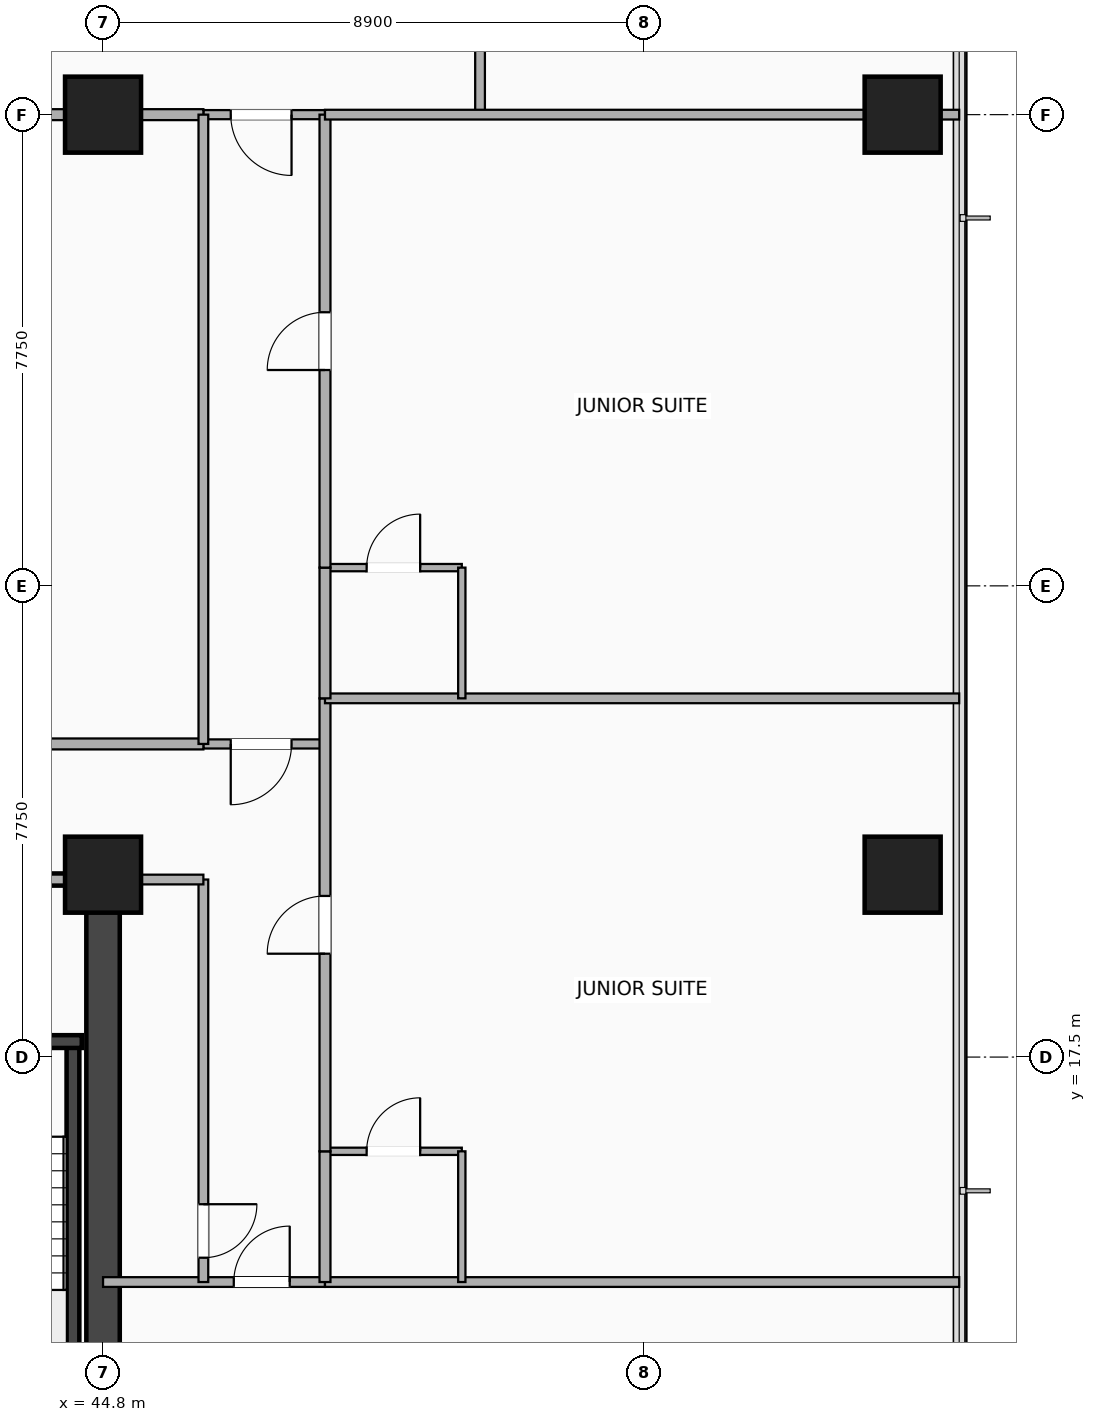
"""IFC4 building model, lengths in metres.
Left out: names, types, materials, properties, quantities, classifications, styles, units other than length and angle.
Written with IfcOpenShell. Run it as: python <this file> out.ifc"""

import sys

from ifc_helpers import new_model, si_unit, direction, frame, frame_2d, origin, origin_2d, place, context, subcontext, project, spatial, rectangle, extrude, element, fill, save


model = new_model("IFC4")
c1 = context("Model", 3, precision=1e-05, world=origin(), true_north=direction((0.0, 1.0)))
c2 = subcontext(c1, "Body", "Model", "MODEL_VIEW")
j1 = project(units=[si_unit("LENGTHUNIT", "METRE"), si_unit("PLANEANGLEUNIT", "RADIAN")], contexts=[c1])
p1 = place(None, origin())
s1 = spatial("IfcSite", under=j1, at=p1, CompositionType="ELEMENT")
p2 = place(p1, origin())
s2 = spatial("IfcBuilding", under=s1, at=p2, CompositionType="ELEMENT")
p3 = place(p2, frame((0.0, 0.0, 98.7)))
s3 = spatial("IfcBuildingStorey", under=s2, at=p3, CompositionType="ELEMENT", Elevation=98.7)
p4 = place(p3, frame((44.8, 3.5, 0.0), z_axis=(0.0, 0.0, 1.0), x_axis=(0.0, 1.0, 0.0)))
e1 = element("IfcWall", 1, at=p4, inside=s3, PredefinedType="SHEAR", context=c2, shape_type="SweptSolid", body=[
    extrude(rectangle(XDim=16.9, YDim=0.55, at=frame_2d((8.45, 0.0))), origin(), (0.0, 0.0, 1.0), 3.24),
])
p5 = place(p3, frame((44.305, 9.745, 0.0), z_axis=(0.0, 0.0, 1.0), x_axis=(0.0, 1.0, 0.0)))
e2 = element("IfcWall", 2, at=p5, inside=s3, PredefinedType="SHEAR", context=c2, shape_type="SweptSolid", body=[
    extrude(rectangle(XDim=8.01, YDim=0.21, at=frame_2d((4.005, 0.0))), origin(), (0.0, 0.0, 1.0), 3.24),
])
p6 = place(p3, frame((37.25, 17.755, 0.0), z_axis=(0.0, 0.0, 1.0), x_axis=(1.0, 0.0, 0.0)))
e3 = element("IfcWall", 3, at=p6, inside=s3, PredefinedType="SHEAR", context=c2, shape_type="SweptSolid", body=[
    extrude(rectangle(XDim=7.2, YDim=0.21, at=frame_2d((3.6, 0.0))), origin(), (0.0, 0.0, 1.0), 3.24),
])
p7 = place(p6, frame((0.25, 0.0, 0.0)))
e4 = element("IfcOpeningElement", 4, at=p7, cuts=e3, PredefinedType="OPENING", context=c2, shape_type="SweptSolid", body=[
    extrude(rectangle(XDim=1.12, YDim=2.2, at=frame_2d((0.56, 1.1))), frame((0.0, 0.115, 0.0), z_axis=(0.0, -1.0, 0.0), x_axis=(1.0, 0.0, 0.0)), (0.0, 0.0, 1.0), 0.23),
])
p8 = place(p6, frame((2.05, 0.0, 0.0)))
e5 = element("IfcOpeningElement", 5, at=p8, cuts=e3, PredefinedType="OPENING", context=c2, shape_type="SweptSolid", body=[
    extrude(rectangle(XDim=1.1, YDim=2.18, at=frame_2d((0.55, 1.09))), frame((0.0, 0.115, 0.0), z_axis=(0.0, -1.0, 0.0), x_axis=(1.0, 0.0, 0.0)), (0.0, 0.0, 1.0), 0.23),
])
p9 = place(p6, frame((5.78, 0.0, 0.0), z_axis=(0.0, 0.0, 1.0), x_axis=(-1.0, 0.0, 0.0)))
e6 = element("IfcOpeningElement", 6, at=p9, cuts=e3, PredefinedType="OPENING", context=c2, shape_type="SweptSolid", body=[
    extrude(rectangle(XDim=1.05, YDim=2.15, at=frame_2d((0.525, 1.075))), frame((0.0, 0.115, 0.0), z_axis=(0.0, -1.0, 0.0), x_axis=(1.0, 0.0, 0.0)), (0.0, 0.0, 1.0), 0.23),
])
for number, where, z_axis, x_axis in (
    (7, (44.8, 20.5, -0.26), (0.0, 0.0, 1.0), (1.0, 0.0, 0.0)),
    (8, (44.8, 33.0, -0.26), (0.0, 0.0, 1.0), (1.0, 0.0, 0.0)),
    (9, (57.95, 20.5, -0.26), (0.0, 0.0, 1.0), (1.0, 0.0, 0.0)),
    (10, (57.95, 33.0, -0.26), (0.0, 0.0, 1.0), (1.0, 0.0, 0.0)),
):
    element("IfcColumn", number, at=place(p3, frame(where, z_axis=z_axis, x_axis=x_axis)), inside=s3, PredefinedType="COLUMN", context=c2, shape_type="SweptSolid", body=[
        extrude(rectangle(XDim=1.25, YDim=1.25, at=origin_2d()), origin(), (0.0, 0.0, 1.0), 3.5),
    ])
p10 = place(p3, frame((37.0, 20.42, 0.0), z_axis=(0.0, 0.0, 1.0), x_axis=(1.0, 0.0, 0.0)))
e11 = element("IfcWall", 11, at=p10, inside=s3, PredefinedType="PARTITIONING", context=c2, shape_type="SweptSolid", body=[
    extrude(rectangle(XDim=7.45, YDim=0.2, at=frame_2d((3.725, 0.0))), origin(), (0.0, 0.0, 1.0), 2.313),
])
p11 = place(p10, frame((4.2, 0.0, 0.0)))
e12 = element("IfcOpeningElement", 12, at=p11, cuts=e11, PredefinedType="OPENING", context=c2, shape_type="SweptSolid", body=[
    extrude(rectangle(XDim=1.1, YDim=2.15, at=frame_2d((0.55, 1.075))), frame((0.0, 0.11, 0.0), z_axis=(0.0, -1.0, 0.0), x_axis=(1.0, 0.0, 0.0)), (0.0, 0.0, 1.0), 0.22),
])
p12 = place(p3, frame((44.8, 13.8, 0.0), z_axis=(0.0, 0.0, 1.0), x_axis=(1.0, 0.0, 0.0)))
e13 = element("IfcWall", 13, at=p12, inside=s3, PredefinedType="PARTITIONING", context=c2, shape_type="SweptSolid", body=[
    extrude(rectangle(XDim=3.65, YDim=0.16, at=frame_2d((1.825, 0.0))), origin(), (0.0, 0.0, 1.0), 2.313),
])
p13 = place(p12, frame((3.07, 0.0, 0.0), z_axis=(0.0, 0.0, 1.0), x_axis=(-1.0, 0.0, 0.0)))
e14 = element("IfcOpeningElement", 14, at=p13, cuts=e13, PredefinedType="OPENING", context=c2, shape_type="SweptSolid", body=[
    extrude(rectangle(XDim=0.92, YDim=2.08, at=frame_2d((0.46, 1.04))), frame((0.0, 0.09, 0.0), z_axis=(0.0, -1.0, 0.0), x_axis=(1.0, 0.0, 0.0)), (0.0, 0.0, 1.0), 0.18),
])
p14 = place(p3, frame((46.45, 13.8, 0.0), z_axis=(0.0, 0.0, 1.0), x_axis=(0.0, 1.0, 0.0)))
e15 = element("IfcWall", 15, at=p14, inside=s3, PredefinedType="PARTITIONING", context=c2, shape_type="SweptSolid", body=[
    extrude(rectangle(XDim=6.62, YDim=0.16, at=frame_2d((3.31, 0.0))), origin(), (0.0, 0.0, 1.0), 2.313),
])
p15 = place(p14, frame((0.4, 0.0, 0.0)))
e16 = element("IfcOpeningElement", 16, at=p15, cuts=e15, PredefinedType="OPENING", context=c2, shape_type="SweptSolid", body=[
    extrude(rectangle(XDim=0.88, YDim=2.08, at=frame_2d((0.44, 1.04))), frame((0.0, 0.09, 0.0), z_axis=(0.0, -1.0, 0.0), x_axis=(1.0, 0.0, 0.0)), (0.0, 0.0, 1.0), 0.18),
])
p16 = place(p3, frame((44.8, 20.42, 0.0), z_axis=(0.0, 0.0, 1.0), x_axis=(1.0, 0.0, 0.0)))
e17 = element("IfcWall", 17, at=p16, inside=s3, PredefinedType="PARTITIONING", context=c2, shape_type="SweptSolid", body=[
    extrude(rectangle(XDim=1.65, YDim=0.16, at=frame_2d((0.825, 0.0))), origin(), (0.0, 0.0, 1.0), 2.313),
])
p17 = place(p3, frame((46.45, 22.65, 0.0), z_axis=(0.0, 0.0, 1.0), x_axis=(1.0, 0.0, 0.0)))
e18 = element("IfcWall", 18, at=p17, inside=s3, PredefinedType="PARTITIONING", context=c2, shape_type="SweptSolid", body=[
    extrude(rectangle(XDim=2.0, YDim=0.15, at=frame_2d((1.0, 0.0))), origin(), (0.0, 0.0, 1.0), 3.24),
])
p18 = place(p17, frame((0.45, 0.0, 0.0)))
e19 = element("IfcOpeningElement", 19, at=p18, cuts=e18, PredefinedType="OPENING", context=c2, shape_type="SweptSolid", body=[
    extrude(rectangle(XDim=1.0, YDim=2.15, at=frame_2d((0.5, 1.075))), frame((0.0, 0.085, 0.0), z_axis=(0.0, -1.0, 0.0), x_axis=(1.0, 0.0, 0.0)), (0.0, 0.0, 1.0), 0.17),
])
p19 = place(p3, frame((46.45, 33.0, 0.0), z_axis=(0.0, 0.0, 1.0), x_axis=(1.0, 0.0, 0.0)))
e20 = element("IfcWall", 20, at=p19, inside=s3, PredefinedType="PARTITIONING", context=c2, shape_type="SweptSolid", body=[
    extrude(rectangle(XDim=2.0, YDim=0.15, at=frame_2d((1.0, 0.0))), origin(), (0.0, 0.0, 1.0), 2.313),
])
p20 = place(p19, frame((0.45, 0.0, 0.0)))
e21 = element("IfcOpeningElement", 21, at=p20, cuts=e20, PredefinedType="OPENING", context=c2, shape_type="SweptSolid", body=[
    extrude(rectangle(XDim=1.0, YDim=2.15, at=frame_2d((0.5, 1.075))), frame((0.0, 0.085, 0.0), z_axis=(0.0, -1.0, 0.0), x_axis=(1.0, 0.0, 0.0)), (0.0, 0.0, 1.0), 0.17),
])
p21 = place(p3, frame((51.0, 33.0, 0.0), z_axis=(0.0, 0.0, 1.0), x_axis=(0.0, 1.0, 0.0)))
e22 = element("IfcWall", 22, at=p21, inside=s3, PredefinedType="PARTITIONING", context=c2, shape_type="SweptSolid", body=[
    extrude(rectangle(XDim=2.05, YDim=0.16, at=frame_2d((1.025, 0.0))), origin(), (0.0, 0.0, 1.0), 2.313),
])
p22 = place(p3, frame((39.1, 22.65, 0.0), z_axis=(0.0, 0.0, 1.0), x_axis=(1.0, 0.0, 0.0)))
e23 = element("IfcWall", 23, at=p22, inside=s3, PredefinedType="PARTITIONING", context=c2, shape_type="SweptSolid", body=[
    extrude(rectangle(XDim=7.35, YDim=0.18, at=frame_2d((3.675, 0.0))), origin(), (0.0, 0.0, 1.0), 2.313),
])
p23 = place(p22, frame((3.2, 0.0, 0.0)))
e24 = element("IfcOpeningElement", 24, at=p23, cuts=e23, PredefinedType="OPENING", context=c2, shape_type="SweptSolid", body=[
    extrude(rectangle(XDim=0.95, YDim=2.15, at=frame_2d((0.475, 1.075))), frame((0.0, 0.1, 0.0), z_axis=(0.0, -1.0, 0.0), x_axis=(1.0, 0.0, 0.0)), (0.0, 0.0, 1.0), 0.2),
])
p24 = place(p3, frame((39.1, 33.0, 0.0), z_axis=(0.0, 0.0, 1.0), x_axis=(1.0, 0.0, 0.0)))
e25 = element("IfcWall", 25, at=p24, inside=s3, PredefinedType="PARTITIONING", context=c2, shape_type="SweptSolid", body=[
    extrude(rectangle(XDim=7.35, YDim=0.18, at=frame_2d((3.675, 0.0))), origin(), (0.0, 0.0, 1.0), 2.313),
])
p25 = place(p3, frame((46.45, 22.65, 0.0), z_axis=(0.0, 0.0, 1.0), x_axis=(0.0, 1.0, 0.0)))
e26 = element("IfcWall", 26, at=p25, inside=s3, PredefinedType="PARTITIONING", context=c2, shape_type="SweptSolid", body=[
    extrude(rectangle(XDim=10.35, YDim=0.16, at=frame_2d((5.175, 0.0))), origin(), (0.0, 0.0, 1.0), 2.313),
])
p26 = place(p3, frame((48.45, 13.8, 0.0), z_axis=(0.0, 0.0, 1.0), x_axis=(1.0, 0.0, 0.0)))
e27 = element("IfcWall", 27, at=p26, inside=s3, PredefinedType="PARTITIONING", context=c2, shape_type="SweptSolid", body=[
    extrude(rectangle(XDim=10.43, YDim=0.16, at=frame_2d((5.215, 0.0))), origin(), (0.0, 0.0, 1.0), 2.603),
])
p27 = place(p3, frame((48.45, 15.95, 0.0), z_axis=(0.0, 0.0, 1.0), x_axis=(1.0, 0.0, 0.0)))
e28 = element("IfcWall", 28, at=p27, inside=s3, PredefinedType="PARTITIONING", context=c2, shape_type="SweptSolid", body=[
    extrude(rectangle(XDim=2.25, YDim=0.12, at=frame_2d((1.125, 0.0))), origin(), (0.0, 0.0, 1.0), 3.24),
])
p28 = place(p27, frame((1.565, 0.0, 0.0), z_axis=(0.0, 0.0, 1.0), x_axis=(-1.0, 0.0, 0.0)))
e29 = element("IfcOpeningElement", 29, at=p28, cuts=e28, PredefinedType="OPENING", context=c2, shape_type="SweptSolid", body=[
    extrude(rectangle(XDim=0.88, YDim=2.08, at=frame_2d((0.44, 1.04))), frame((0.0, 0.07, 0.0), z_axis=(0.0, -1.0, 0.0), x_axis=(1.0, 0.0, 0.0)), (0.0, 0.0, 1.0), 0.14),
])
p29 = place(p3, frame((50.7, 13.8, 0.0), z_axis=(0.0, 0.0, 1.0), x_axis=(0.0, 1.0, 0.0)))
e30 = element("IfcWall", 30, at=p29, inside=s3, PredefinedType="PARTITIONING", context=c2, shape_type="SweptSolid", body=[
    extrude(rectangle(XDim=2.15, YDim=0.12, at=frame_2d((1.075, 0.0))), origin(), (0.0, 0.0, 1.0), 2.922),
])
p30 = place(p3, frame((48.45, 13.8, 0.0), z_axis=(0.0, 0.0, 1.0), x_axis=(0.0, 1.0, 0.0)))
e31 = element("IfcWall", 31, at=p30, inside=s3, PredefinedType="PARTITIONING", context=c2, shape_type="SweptSolid", body=[
    extrude(rectangle(XDim=2.15, YDim=0.18, at=frame_2d((1.075, 0.0))), origin(), (0.0, 0.0, 1.0), 2.922),
])
p31 = place(p3, frame((48.45, 15.95, 0.0), z_axis=(0.0, 0.0, 1.0), x_axis=(0.0, 1.0, 0.0)))
e32 = element("IfcWall", 32, at=p31, inside=s3, PredefinedType="PARTITIONING", context=c2, shape_type="SweptSolid", body=[
    extrude(rectangle(XDim=7.45, YDim=0.18, at=frame_2d((3.725, 0.0))), origin(), (0.0, 0.0, 1.0), 2.313),
])
p32 = place(p31, frame((4.2, 0.0, 0.0), z_axis=(0.0, 0.0, 1.0), x_axis=(-1.0, 0.0, 0.0)))
e33 = element("IfcOpeningElement", 33, at=p32, cuts=e32, PredefinedType="OPENING", context=c2, shape_type="SweptSolid", body=[
    extrude(rectangle(XDim=0.95, YDim=2.15, at=frame_2d((0.475, 1.075))), frame((0.0, 0.1, 0.0), z_axis=(0.0, -1.0, 0.0), x_axis=(1.0, 0.0, 0.0)), (0.0, 0.0, 1.0), 0.2),
])
p33 = place(p3, frame((48.45, 23.4, 0.0), z_axis=(0.0, 0.0, 1.0), x_axis=(1.0, 0.0, 0.0)))
e34 = element("IfcWall", 34, at=p33, inside=s3, PredefinedType="PARTITIONING", context=c2, shape_type="SweptSolid", body=[
    extrude(rectangle(XDim=10.43, YDim=0.16, at=frame_2d((5.215, 0.0))), origin(), (0.0, 0.0, 1.0), 2.603),
])
p34 = place(p3, frame((48.45, 25.55, 0.0), z_axis=(0.0, 0.0, 1.0), x_axis=(1.0, 0.0, 0.0)))
e35 = element("IfcWall", 35, at=p34, inside=s3, PredefinedType="PARTITIONING", context=c2, shape_type="SweptSolid", body=[
    extrude(rectangle(XDim=2.25, YDim=0.12, at=frame_2d((1.125, 0.0))), origin(), (0.0, 0.0, 1.0), 3.24),
])
p35 = place(p34, frame((1.565, 0.0, 0.0), z_axis=(0.0, 0.0, 1.0), x_axis=(-1.0, 0.0, 0.0)))
e36 = element("IfcOpeningElement", 36, at=p35, cuts=e35, PredefinedType="OPENING", context=c2, shape_type="SweptSolid", body=[
    extrude(rectangle(XDim=0.88, YDim=2.08, at=frame_2d((0.44, 1.04))), frame((0.0, 0.07, 0.0), z_axis=(0.0, -1.0, 0.0), x_axis=(1.0, 0.0, 0.0)), (0.0, 0.0, 1.0), 0.14),
])
p36 = place(p3, frame((50.7, 23.4, 0.0), z_axis=(0.0, 0.0, 1.0), x_axis=(0.0, 1.0, 0.0)))
e37 = element("IfcWall", 37, at=p36, inside=s3, PredefinedType="PARTITIONING", context=c2, shape_type="SweptSolid", body=[
    extrude(rectangle(XDim=2.15, YDim=0.12, at=frame_2d((1.075, 0.0))), origin(), (0.0, 0.0, 1.0), 2.818),
])
p37 = place(p3, frame((48.45, 23.4, 0.0), z_axis=(0.0, 0.0, 1.0), x_axis=(0.0, 1.0, 0.0)))
e38 = element("IfcWall", 38, at=p37, inside=s3, PredefinedType="PARTITIONING", context=c2, shape_type="SweptSolid", body=[
    extrude(rectangle(XDim=2.15, YDim=0.18, at=frame_2d((1.075, 0.0))), origin(), (0.0, 0.0, 1.0), 2.818),
])
p38 = place(p3, frame((48.45, 25.55, 0.0), z_axis=(0.0, 0.0, 1.0), x_axis=(0.0, 1.0, 0.0)))
e39 = element("IfcWall", 39, at=p38, inside=s3, PredefinedType="PARTITIONING", context=c2, shape_type="SweptSolid", body=[
    extrude(rectangle(XDim=7.45, YDim=0.18, at=frame_2d((3.725, 0.0))), origin(), (0.0, 0.0, 1.0), 2.313),
])
p39 = place(p38, frame((4.2, 0.0, 0.0), z_axis=(0.0, 0.0, 1.0), x_axis=(-1.0, 0.0, 0.0)))
e40 = element("IfcOpeningElement", 40, at=p39, cuts=e39, PredefinedType="OPENING", context=c2, shape_type="SweptSolid", body=[
    extrude(rectangle(XDim=0.95, YDim=2.15, at=frame_2d((0.475, 1.075))), frame((0.0, 0.1, 0.0), z_axis=(0.0, -1.0, 0.0), x_axis=(1.0, 0.0, 0.0)), (0.0, 0.0, 1.0), 0.2),
])
p40 = place(p3, frame((48.45, 33.0, 0.0), z_axis=(0.0, 0.0, 1.0), x_axis=(1.0, 0.0, 0.0)))
e41 = element("IfcWall", 41, at=p40, inside=s3, PredefinedType="PARTITIONING", context=c2, shape_type="SweptSolid", body=[
    extrude(rectangle(XDim=10.43, YDim=0.16, at=frame_2d((5.215, 0.0))), origin(), (0.0, 0.0, 1.0), 2.313),
])
p41 = place(p13, origin())
e42 = element("IfcDoor", 42, at=p41, inside=s3, OperationType="SINGLE_SWING_RIGHT", PredefinedType="DOOR", context=c2, shape_type="SweptSolid", body=[
    extrude(rectangle(XDim=0.92, YDim=2.08, at=frame_2d((0.46, 1.04))), frame((0.0, 0.025, 0.0), z_axis=(0.0, -1.0, 0.0), x_axis=(1.0, 0.0, 0.0)), (0.0, 0.0, 1.0), 0.05),
])
fill(e14, e42)
p42 = place(p15, origin())
e43 = element("IfcDoor", 43, at=p42, inside=s3, OperationType="SINGLE_SWING_RIGHT", PredefinedType="DOOR", context=c2, shape_type="SweptSolid", body=[
    extrude(rectangle(XDim=0.88, YDim=2.08, at=frame_2d((0.44, 1.04))), frame((0.0, 0.025, 0.0), z_axis=(0.0, -1.0, 0.0), x_axis=(1.0, 0.0, 0.0)), (0.0, 0.0, 1.0), 0.05),
])
fill(e16, e43)
p43 = place(p18, origin())
e44 = element("IfcDoor", 44, at=p43, inside=s3, OperationType="SINGLE_SWING_LEFT", PredefinedType="DOOR", context=c2, shape_type="SweptSolid", body=[
    extrude(rectangle(XDim=1.0, YDim=2.15, at=frame_2d((0.5, 1.075))), frame((0.0, 0.025, 0.0), z_axis=(0.0, -1.0, 0.0), x_axis=(1.0, 0.0, 0.0)), (0.0, 0.0, 1.0), 0.05),
])
fill(e19, e44)
p44 = place(p20, origin())
e45 = element("IfcDoor", 45, at=p44, inside=s3, OperationType="SINGLE_SWING_RIGHT", PredefinedType="DOOR", context=c2, shape_type="SweptSolid", body=[
    extrude(rectangle(XDim=1.0, YDim=2.15, at=frame_2d((0.5, 1.075))), frame((0.0, 0.025, 0.0), z_axis=(0.0, -1.0, 0.0), x_axis=(1.0, 0.0, 0.0)), (0.0, 0.0, 1.0), 0.05),
])
fill(e21, e45)
p45 = place(p28, origin())
e46 = element("IfcDoor", 46, at=p45, inside=s3, OperationType="SINGLE_SWING_RIGHT", PredefinedType="DOOR", context=c2, shape_type="SweptSolid", body=[
    extrude(rectangle(XDim=0.88, YDim=2.08, at=frame_2d((0.44, 1.04))), frame((0.0, 0.025, 0.0), z_axis=(0.0, -1.0, 0.0), x_axis=(1.0, 0.0, 0.0)), (0.0, 0.0, 1.0), 0.05),
])
fill(e29, e46)
p46 = place(p32, origin())
e47 = element("IfcDoor", 47, at=p46, inside=s3, OperationType="SINGLE_SWING_LEFT", PredefinedType="DOOR", context=c2, shape_type="SweptSolid", body=[
    extrude(rectangle(XDim=0.95, YDim=2.15, at=frame_2d((0.475, 1.075))), frame((0.0, 0.025, 0.0), z_axis=(0.0, -1.0, 0.0), x_axis=(1.0, 0.0, 0.0)), (0.0, 0.0, 1.0), 0.05),
])
fill(e33, e47)
p47 = place(p35, origin())
e48 = element("IfcDoor", 48, at=p47, inside=s3, OperationType="SINGLE_SWING_RIGHT", PredefinedType="DOOR", context=c2, shape_type="SweptSolid", body=[
    extrude(rectangle(XDim=0.88, YDim=2.08, at=frame_2d((0.44, 1.04))), frame((0.0, 0.025, 0.0), z_axis=(0.0, -1.0, 0.0), x_axis=(1.0, 0.0, 0.0)), (0.0, 0.0, 1.0), 0.05),
])
fill(e36, e48)
p48 = place(p39, origin())
e49 = element("IfcDoor", 49, at=p48, inside=s3, OperationType="SINGLE_SWING_LEFT", PredefinedType="DOOR", context=c2, shape_type="SweptSolid", body=[
    extrude(rectangle(XDim=0.95, YDim=2.15, at=frame_2d((0.475, 1.075))), frame((0.0, 0.025, 0.0), z_axis=(0.0, -1.0, 0.0), x_axis=(1.0, 0.0, 0.0)), (0.0, 0.0, 1.0), 0.05),
])
fill(e40, e49)
save(model, sys.argv[1])
